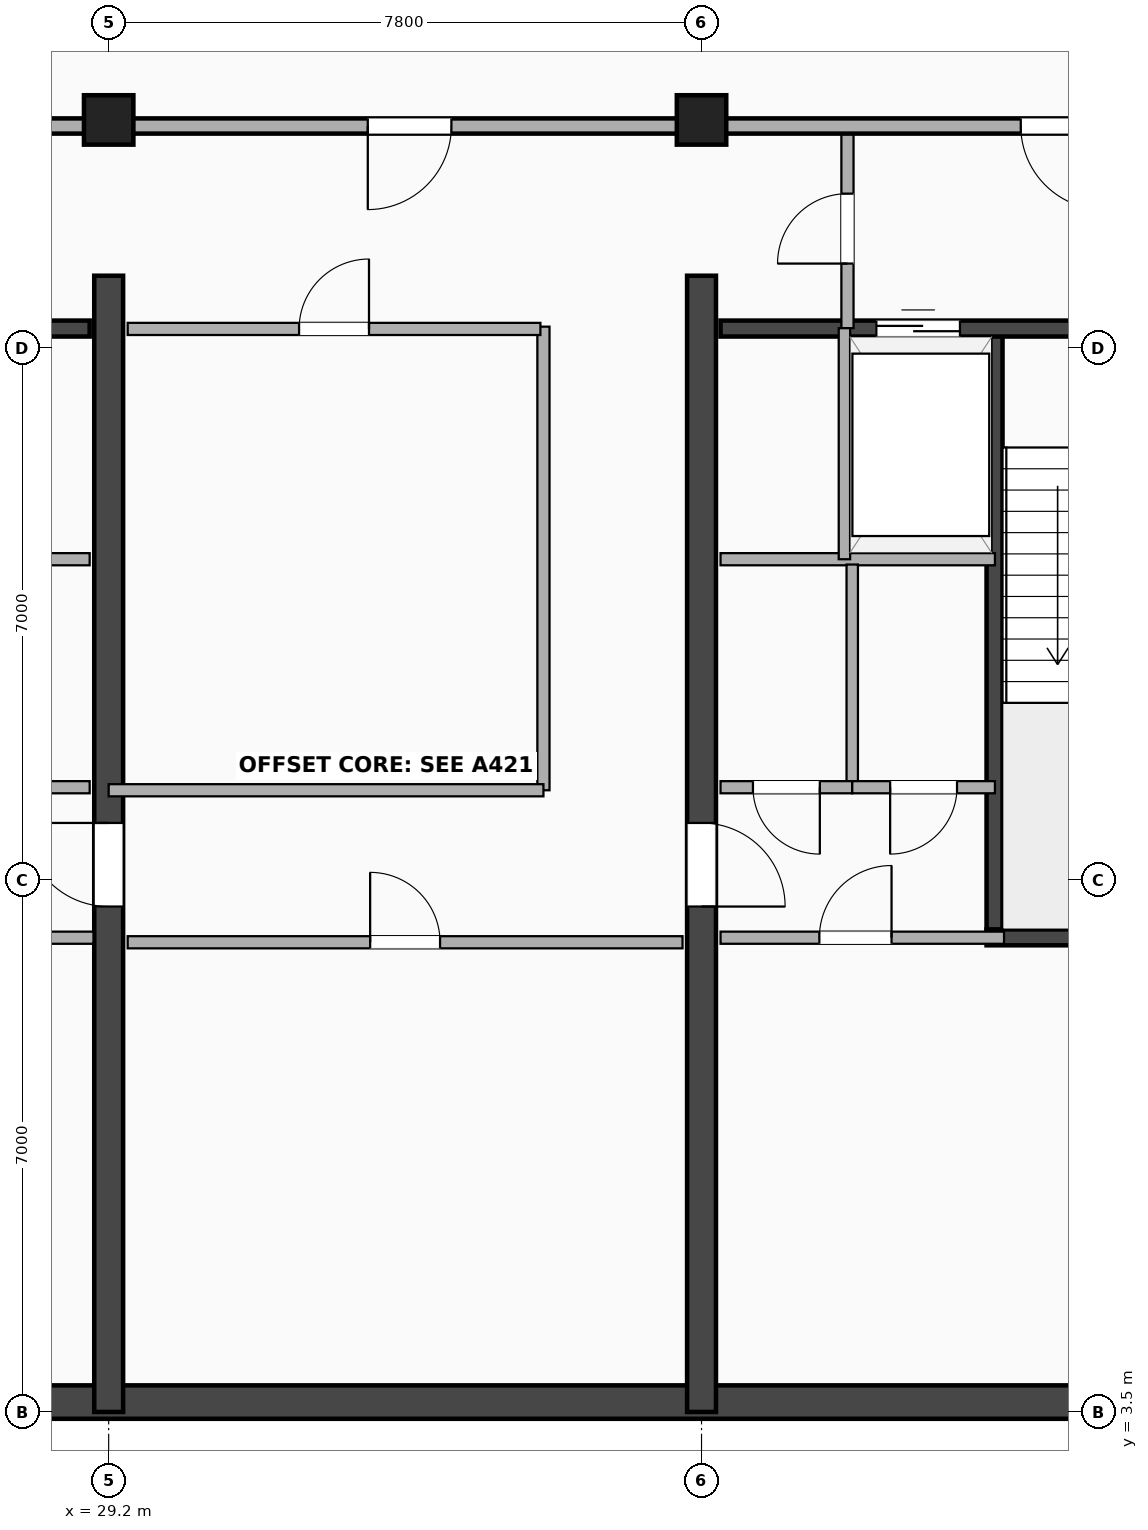
"""IFC4 building model, lengths in metres.
Left out: names, types, materials, properties, quantities, classifications, styles, units other than length and angle.
Written with IfcOpenShell. Run it as: python <this file> out.ifc"""

import sys

from ifc_helpers import new_model, si_unit, direction, frame, frame_2d, origin, origin_2d, place, context, subcontext, project, spatial, rectangle, extrude, element, fill, save


model = new_model("IFC4")
c1 = context("Model", 3, precision=1e-05, world=origin(), true_north=direction((0.0, 1.0)))
c2 = subcontext(c1, "Body", "Model", "MODEL_VIEW")
j1 = project(units=[si_unit("LENGTHUNIT", "METRE"), si_unit("PLANEANGLEUNIT", "RADIAN")], contexts=[c1])
p1 = place(None, origin())
s1 = spatial("IfcSite", under=j1, at=p1, CompositionType="ELEMENT")
p2 = place(p1, origin())
s2 = spatial("IfcBuilding", under=s1, at=p2, CompositionType="ELEMENT")
p3 = place(p2, frame((0.0, 0.0, 307.9)))
s3 = spatial("IfcBuildingStorey", under=s2, at=p3, CompositionType="ELEMENT", Elevation=307.9)
p4 = place(p3, frame((20.3, 3.63, 0.0), z_axis=(0.0, 0.0, 1.0), x_axis=(1.0, 0.0, 0.0)))
e1 = element("IfcWall", 1, at=p4, inside=s3, PredefinedType="SHEAR", context=c2, shape_type="SweptSolid", body=[
    extrude(rectangle(XDim=24.5, YDim=0.44, at=frame_2d((12.25, 0.0))), origin(), (0.0, 0.0, 1.0), 4.3),
])
p5 = place(p3, frame((29.2, 3.5, 0.0), z_axis=(0.0, 0.0, 1.0), x_axis=(0.0, 1.0, 0.0)))
e2 = element("IfcWall", 2, at=p5, inside=s3, PredefinedType="SHEAR", context=c2, shape_type="SweptSolid", body=[
    extrude(rectangle(XDim=14.95, YDim=0.38, at=frame_2d((7.475, 0.0))), origin(), (0.0, 0.0, 1.0), 4.3),
])
p6 = place(p5, frame((7.75, 0.0, 0.0), z_axis=(0.0, 0.0, 1.0), x_axis=(-1.0, 0.0, 0.0)))
e3 = element("IfcOpeningElement", 3, at=p6, cuts=e2, PredefinedType="OPENING", context=c2, shape_type="SweptSolid", body=[
    extrude(rectangle(XDim=1.1, YDim=2.15, at=frame_2d((0.55, 1.075))), frame((0.0, 0.2, 0.0), z_axis=(0.0, -1.0, 0.0), x_axis=(1.0, 0.0, 0.0)), (0.0, 0.0, 1.0), 0.4),
])
p7 = place(p3, frame((37.0, 3.5, 0.0), z_axis=(0.0, 0.0, 1.0), x_axis=(0.0, 1.0, 0.0)))
e4 = element("IfcWall", 4, at=p7, inside=s3, PredefinedType="SHEAR", context=c2, shape_type="SweptSolid", body=[
    extrude(rectangle(XDim=14.95, YDim=0.38, at=frame_2d((7.475, 0.0))), origin(), (0.0, 0.0, 1.0), 4.3),
])
p8 = place(p7, frame((6.65, 0.0, 0.0)))
e5 = element("IfcOpeningElement", 5, at=p8, cuts=e4, PredefinedType="OPENING", context=c2, shape_type="SweptSolid", body=[
    extrude(rectangle(XDim=1.1, YDim=2.15, at=frame_2d((0.55, 1.075))), frame((0.0, 0.2, 0.0), z_axis=(0.0, -1.0, 0.0), x_axis=(1.0, 0.0, 0.0)), (0.0, 0.0, 1.0), 0.4),
])
p9 = place(p3, frame((20.65, 17.755, 0.0), z_axis=(0.0, 0.0, 1.0), x_axis=(1.0, 0.0, 0.0)))
e6 = element("IfcWall", 6, at=p9, inside=s3, PredefinedType="SHEAR", context=c2, shape_type="SweptSolid", body=[
    extrude(rectangle(XDim=8.3, YDim=0.21, at=frame_2d((4.15, 0.0))), origin(), (0.0, 0.0, 1.0), 4.3),
])
p10 = place(p9, frame((2.2, 0.0, 0.0), z_axis=(0.0, 0.0, 1.0), x_axis=(-1.0, 0.0, 0.0)))
e7 = element("IfcOpeningElement", 7, at=p10, cuts=e6, PredefinedType="OPENING", context=c2, shape_type="SweptSolid", body=[
    extrude(rectangle(XDim=1.05, YDim=2.15, at=frame_2d((0.525, 1.075))), frame((0.0, 0.115, 0.0), z_axis=(0.0, -1.0, 0.0), x_axis=(1.0, 0.0, 0.0)), (0.0, 0.0, 1.0), 0.23),
])
p11 = place(p9, frame((4.15, 0.0, 0.0)))
e8 = element("IfcOpeningElement", 8, at=p11, cuts=e6, PredefinedType="OPENING", context=c2, shape_type="SweptSolid", body=[
    extrude(rectangle(XDim=1.1, YDim=2.18, at=frame_2d((0.55, 1.09))), frame((0.0, 0.115, 0.0), z_axis=(0.0, -1.0, 0.0), x_axis=(1.0, 0.0, 0.0)), (0.0, 0.0, 1.0), 0.23),
])
p12 = place(p3, frame((40.855, 9.745, 0.0), z_axis=(0.0, 0.0, 1.0), x_axis=(0.0, 1.0, 0.0)))
e9 = element("IfcWall", 9, at=p12, inside=s3, PredefinedType="SHEAR", context=c2, shape_type="SweptSolid", body=[
    extrude(rectangle(XDim=8.01, YDim=0.21, at=frame_2d((4.005, 0.0))), origin(), (0.0, 0.0, 1.0), 4.3),
])
p13 = place(p3, frame((40.75, 9.745, 0.0), z_axis=(0.0, 0.0, 1.0), x_axis=(1.0, 0.0, 0.0)))
e10 = element("IfcWall", 10, at=p13, inside=s3, PredefinedType="SHEAR", context=c2, shape_type="SweptSolid", body=[
    extrude(rectangle(XDim=3.66, YDim=0.21, at=frame_2d((1.83, 0.0))), origin(), (0.0, 0.0, 1.0), 4.3),
])
p14 = place(p3, frame((37.25, 17.755, 0.0), z_axis=(0.0, 0.0, 1.0), x_axis=(1.0, 0.0, 0.0)))
e11 = element("IfcWall", 11, at=p14, inside=s3, PredefinedType="SHEAR", context=c2, shape_type="SweptSolid", body=[
    extrude(rectangle(XDim=7.2, YDim=0.21, at=frame_2d((3.6, 0.0))), origin(), (0.0, 0.0, 1.0), 4.3),
])
p15 = place(p14, frame((2.05, 0.0, 0.0)))
e12 = element("IfcOpeningElement", 12, at=p15, cuts=e11, PredefinedType="OPENING", context=c2, shape_type="SweptSolid", body=[
    extrude(rectangle(XDim=1.1, YDim=2.18, at=frame_2d((0.55, 1.09))), frame((0.0, 0.115, 0.0), z_axis=(0.0, -1.0, 0.0), x_axis=(1.0, 0.0, 0.0)), (0.0, 0.0, 1.0), 0.23),
])
p16 = place(p14, frame((5.78, 0.0, 0.0), z_axis=(0.0, 0.0, 1.0), x_axis=(-1.0, 0.0, 0.0)))
e13 = element("IfcOpeningElement", 13, at=p16, cuts=e11, PredefinedType="OPENING", context=c2, shape_type="SweptSolid", body=[
    extrude(rectangle(XDim=1.05, YDim=2.15, at=frame_2d((0.525, 1.075))), frame((0.0, 0.115, 0.0), z_axis=(0.0, -1.0, 0.0), x_axis=(1.0, 0.0, 0.0)), (0.0, 0.0, 1.0), 0.23),
])
for number, where, z_axis, x_axis in (
    (14, (29.2, 20.5, -0.3), (0.0, 0.0, 1.0), (1.0, 0.0, 0.0)),
    (15, (37.0, 20.5, -0.3), (0.0, 0.0, 1.0), (1.0, 0.0, 0.0)),
):
    element("IfcColumn", number, at=place(p3, frame(where, z_axis=z_axis, x_axis=x_axis)), inside=s3, PredefinedType="COLUMN", context=c2, shape_type="SweptSolid", body=[
        extrude(rectangle(XDim=0.65, YDim=0.65, at=origin_2d()), origin(), (0.0, 0.0, 1.0), 4.6),
    ])
p17 = place(p3, frame((38.92, 17.76, 0.0), z_axis=(0.0, 0.0, 1.0), x_axis=(0.0, 1.0, 0.0)))
e16 = element("IfcWall", 16, at=p17, inside=s3, PredefinedType="PARTITIONING", context=c2, shape_type="SweptSolid", body=[
    extrude(rectangle(XDim=2.66, YDim=0.16, at=frame_2d((1.33, 0.0))), origin(), (0.0, 0.0, 1.0), 4.3),
])
p18 = place(p17, frame((1.77, 0.0, 0.0), z_axis=(0.0, 0.0, 1.0), x_axis=(-1.0, 0.0, 0.0)))
e17 = element("IfcOpeningElement", 17, at=p18, cuts=e16, PredefinedType="OPENING", context=c2, shape_type="SweptSolid", body=[
    extrude(rectangle(XDim=0.92, YDim=2.08, at=frame_2d((0.46, 1.04))), frame((0.0, 0.09, 0.0), z_axis=(0.0, -1.0, 0.0), x_axis=(1.0, 0.0, 0.0)), (0.0, 0.0, 1.0), 0.18),
])
p19 = place(p3, frame((24.22, 14.72, 0.0), z_axis=(0.0, 0.0, 1.0), x_axis=(1.0, 0.0, 0.0)))
e18 = element("IfcWall", 18, at=p19, inside=s3, PredefinedType="PARTITIONING", context=c2, shape_type="SweptSolid", body=[
    extrude(rectangle(XDim=4.73, YDim=0.16, at=frame_2d((2.365, 0.0))), origin(), (0.0, 0.0, 1.0), 4.3),
])
p20 = place(p3, frame((37.25, 14.72, 0.0), z_axis=(0.0, 0.0, 1.0), x_axis=(1.0, 0.0, 0.0)))
e19 = element("IfcWall", 19, at=p20, inside=s3, PredefinedType="PARTITIONING", context=c2, shape_type="SweptSolid", body=[
    extrude(rectangle(XDim=3.61, YDim=0.16, at=frame_2d((1.805, 0.0))), origin(), (0.0, 0.0, 1.0), 4.3),
])
p21 = place(p3, frame((38.88, 14.72, 0.0), z_axis=(0.0, 0.0, 1.0), x_axis=(0.0, 1.0, 0.0)))
e20 = element("IfcWall", 20, at=p21, inside=s3, PredefinedType="PARTITIONING", context=c2, shape_type="SweptSolid", body=[
    extrude(rectangle(XDim=3.04, YDim=0.15, at=frame_2d((1.52, 0.0))), origin(), (0.0, 0.0, 1.0), 4.3),
])
p22 = place(p3, frame((26.38, 20.42, 0.0), z_axis=(0.0, 0.0, 1.0), x_axis=(1.0, 0.0, 0.0)))
e21 = element("IfcWall", 21, at=p22, inside=s3, PredefinedType="PARTITIONING", context=c2, shape_type="SweptSolid", body=[
    extrude(rectangle(XDim=2.82, YDim=0.2, at=frame_2d((1.41, 0.0))), origin(), (0.0, 0.0, 1.0), 2.605),
])
p23 = place(p3, frame((29.2, 20.42, 0.0), z_axis=(0.0, 0.0, 1.0), x_axis=(1.0, 0.0, 0.0)))
e22 = element("IfcWall", 22, at=p23, inside=s3, PredefinedType="PARTITIONING", context=c2, shape_type="SweptSolid", body=[
    extrude(rectangle(XDim=7.8, YDim=0.2, at=frame_2d((3.9, 0.0))), origin(), (0.0, 0.0, 1.0), 2.605),
])
p24 = place(p23, frame((3.409, 0.0, 0.0)))
e23 = element("IfcOpeningElement", 23, at=p24, cuts=e22, PredefinedType="OPENING", context=c2, shape_type="SweptSolid", body=[
    extrude(rectangle(XDim=1.1, YDim=2.15, at=frame_2d((0.55, 1.075))), frame((0.0, 0.11, 0.0), z_axis=(0.0, -1.0, 0.0), x_axis=(1.0, 0.0, 0.0)), (0.0, 0.0, 1.0), 0.22),
])
p25 = place(p3, frame((37.0, 20.42, 0.0), z_axis=(0.0, 0.0, 1.0), x_axis=(1.0, 0.0, 0.0)))
e24 = element("IfcWall", 24, at=p25, inside=s3, PredefinedType="PARTITIONING", context=c2, shape_type="SweptSolid", body=[
    extrude(rectangle(XDim=7.45, YDim=0.2, at=frame_2d((3.725, 0.0))), origin(), (0.0, 0.0, 1.0), 2.605),
])
p26 = place(p25, frame((4.2, 0.0, 0.0)))
e25 = element("IfcOpeningElement", 25, at=p26, cuts=e24, PredefinedType="OPENING", context=c2, shape_type="SweptSolid", body=[
    extrude(rectangle(XDim=1.1, YDim=2.15, at=frame_2d((0.55, 1.075))), frame((0.0, 0.11, 0.0), z_axis=(0.0, -1.0, 0.0), x_axis=(1.0, 0.0, 0.0)), (0.0, 0.0, 1.0), 0.22),
])
p27 = place(p3, frame((24.22, 11.72, 0.0), z_axis=(0.0, 0.0, 1.0), x_axis=(1.0, 0.0, 0.0)))
e26 = element("IfcWall", 26, at=p27, inside=s3, PredefinedType="PARTITIONING", context=c2, shape_type="SweptSolid", body=[
    extrude(rectangle(XDim=4.73, YDim=0.16, at=frame_2d((2.365, 0.0))), origin(), (0.0, 0.0, 1.0), 4.3),
])
p28 = place(p27, frame((1.905, 0.0, 0.0)))
e27 = element("IfcOpeningElement", 27, at=p28, cuts=e26, PredefinedType="OPENING", context=c2, shape_type="SweptSolid", body=[
    extrude(rectangle(XDim=0.92, YDim=2.08, at=frame_2d((0.46, 1.04))), frame((0.0, 0.09, 0.0), z_axis=(0.0, -1.0, 0.0), x_axis=(1.0, 0.0, 0.0)), (0.0, 0.0, 1.0), 0.18),
])
p29 = place(p3, frame((38.983, 11.72, 0.0), z_axis=(0.0, 0.0, 1.0), x_axis=(0.0, 1.0, 0.0)))
e28 = element("IfcWall", 28, at=p29, inside=s3, PredefinedType="PARTITIONING", context=c2, shape_type="SweptSolid", body=[
    extrude(rectangle(XDim=2.93, YDim=0.15, at=frame_2d((1.465, 0.0))), origin(), (0.0, 0.0, 1.0), 4.3),
])
p30 = place(p3, frame((37.25, 11.72, 0.0), z_axis=(0.0, 0.0, 1.0), x_axis=(1.0, 0.0, 0.0)))
e29 = element("IfcWall", 29, at=p30, inside=s3, PredefinedType="PARTITIONING", context=c2, shape_type="SweptSolid", body=[
    extrude(rectangle(XDim=1.733, YDim=0.16, at=frame_2d((0.866, 0.0))), origin(), (0.0, 0.0, 1.0), 4.3),
])
p31 = place(p30, frame((0.427, 0.0, 0.0)))
e30 = element("IfcOpeningElement", 30, at=p31, cuts=e29, PredefinedType="OPENING", context=c2, shape_type="SweptSolid", body=[
    extrude(rectangle(XDim=0.88, YDim=2.08, at=frame_2d((0.44, 1.04))), frame((0.0, 0.09, 0.0), z_axis=(0.0, -1.0, 0.0), x_axis=(1.0, 0.0, 0.0)), (0.0, 0.0, 1.0), 0.18),
])
p32 = place(p3, frame((38.983, 11.72, 0.0), z_axis=(0.0, 0.0, 1.0), x_axis=(1.0, 0.0, 0.0)))
e31 = element("IfcWall", 31, at=p32, inside=s3, PredefinedType="PARTITIONING", context=c2, shape_type="SweptSolid", body=[
    extrude(rectangle(XDim=1.877, YDim=0.16, at=frame_2d((0.938, 0.0))), origin(), (0.0, 0.0, 1.0), 4.3),
])
p33 = place(p32, frame((0.499, 0.0, 0.0)))
e32 = element("IfcOpeningElement", 32, at=p33, cuts=e31, PredefinedType="OPENING", context=c2, shape_type="SweptSolid", body=[
    extrude(rectangle(XDim=0.88, YDim=2.08, at=frame_2d((0.44, 1.04))), frame((0.0, 0.09, 0.0), z_axis=(0.0, -1.0, 0.0), x_axis=(1.0, 0.0, 0.0)), (0.0, 0.0, 1.0), 0.18),
])
p34 = place(p3, frame((24.2, 9.74, 0.0), z_axis=(0.0, 0.0, 1.0), x_axis=(1.0, 0.0, 0.0)))
e33 = element("IfcWall", 33, at=p34, inside=s3, PredefinedType="PARTITIONING", context=c2, shape_type="SweptSolid", body=[
    extrude(rectangle(XDim=4.8, YDim=0.16, at=frame_2d((2.4, 0.0))), origin(), (0.0, 0.0, 1.0), 4.3),
])
p35 = place(p34, frame((2.75, 0.0, 0.0), z_axis=(0.0, 0.0, 1.0), x_axis=(-1.0, 0.0, 0.0)))
e34 = element("IfcOpeningElement", 34, at=p35, cuts=e33, PredefinedType="OPENING", context=c2, shape_type="SweptSolid", body=[
    extrude(rectangle(XDim=0.95, YDim=2.15, at=frame_2d((0.475, 1.075))), frame((0.0, 0.09, 0.0), z_axis=(0.0, -1.0, 0.0), x_axis=(1.0, 0.0, 0.0)), (0.0, 0.0, 1.0), 0.18),
])
p36 = place(p3, frame((37.25, 9.74, 0.0), z_axis=(0.0, 0.0, 1.0), x_axis=(1.0, 0.0, 0.0)))
e35 = element("IfcWall", 35, at=p36, inside=s3, PredefinedType="PARTITIONING", context=c2, shape_type="SweptSolid", body=[
    extrude(rectangle(XDim=3.73, YDim=0.16, at=frame_2d((1.865, 0.0))), origin(), (0.0, 0.0, 1.0), 4.3),
])
p37 = place(p36, frame((2.25, 0.0, 0.0), z_axis=(0.0, 0.0, 1.0), x_axis=(-1.0, 0.0, 0.0)))
e36 = element("IfcOpeningElement", 36, at=p37, cuts=e35, PredefinedType="OPENING", context=c2, shape_type="SweptSolid", body=[
    extrude(rectangle(XDim=0.95, YDim=2.15, at=frame_2d((0.475, 1.075))), frame((0.0, 0.09, 0.0), z_axis=(0.0, -1.0, 0.0), x_axis=(1.0, 0.0, 0.0)), (0.0, 0.0, 1.0), 0.18),
])
p38 = place(p3, frame((34.92, 11.68, 0.0), z_axis=(0.0, 0.0, 1.0), x_axis=(0.0, 1.0, 0.0)))
e37 = element("IfcWall", 37, at=p38, inside=s3, PredefinedType="PARTITIONING", context=c2, shape_type="SweptSolid", body=[
    extrude(rectangle(XDim=6.1, YDim=0.16, at=frame_2d((3.05, 0.0))), origin(), (0.0, 0.0, 1.0), 4.3),
])
p39 = place(p3, frame((29.45, 9.68, 0.0), z_axis=(0.0, 0.0, 1.0), x_axis=(1.0, 0.0, 0.0)))
e38 = element("IfcWall", 38, at=p39, inside=s3, PredefinedType="PARTITIONING", context=c2, shape_type="SweptSolid", body=[
    extrude(rectangle(XDim=7.3, YDim=0.16, at=frame_2d((3.65, 0.0))), origin(), (0.0, 0.0, 1.0), 4.3),
])
p40 = place(p39, frame((4.11, 0.0, 0.0), z_axis=(0.0, 0.0, 1.0), x_axis=(-1.0, 0.0, 0.0)))
e39 = element("IfcOpeningElement", 39, at=p40, cuts=e38, PredefinedType="OPENING", context=c2, shape_type="SweptSolid", body=[
    extrude(rectangle(XDim=0.92, YDim=2.08, at=frame_2d((0.46, 1.04))), frame((0.0, 0.09, 0.0), z_axis=(0.0, -1.0, 0.0), x_axis=(1.0, 0.0, 0.0)), (0.0, 0.0, 1.0), 0.18),
])
p41 = place(p3, frame((29.2, 11.68, 0.0), z_axis=(0.0, 0.0, 1.0), x_axis=(1.0, 0.0, 0.0)))
e40 = element("IfcWall", 40, at=p41, inside=s3, PredefinedType="PARTITIONING", context=c2, shape_type="SweptSolid", body=[
    extrude(rectangle(XDim=5.72, YDim=0.16, at=frame_2d((2.86, 0.0))), origin(), (0.0, 0.0, 1.0), 4.3),
])
p42 = place(p3, frame((29.45, 17.75, 0.0), z_axis=(0.0, 0.0, 1.0), x_axis=(1.0, 0.0, 0.0)))
e41 = element("IfcWall", 41, at=p42, inside=s3, PredefinedType="PARTITIONING", context=c2, shape_type="SweptSolid", body=[
    extrude(rectangle(XDim=5.43, YDim=0.16, at=frame_2d((2.715, 0.0))), origin(), (0.0, 0.0, 1.0), 4.3),
])
p43 = place(p42, frame((3.175, 0.0, 0.0), z_axis=(0.0, 0.0, 1.0), x_axis=(-1.0, 0.0, 0.0)))
e42 = element("IfcOpeningElement", 42, at=p43, cuts=e41, PredefinedType="OPENING", context=c2, shape_type="SweptSolid", body=[
    extrude(rectangle(XDim=0.92, YDim=2.08, at=frame_2d((0.46, 1.04))), frame((0.0, 0.09, 0.0), z_axis=(0.0, -1.0, 0.0), x_axis=(1.0, 0.0, 0.0)), (0.0, 0.0, 1.0), 0.18),
])
p44 = place(p15, origin())
e43 = element("IfcDoor", 43, at=p44, inside=s3, OperationType="DOUBLE_DOOR_SLIDING", PredefinedType="DOOR", context=c2, shape_type="SweptSolid", body=[
    extrude(rectangle(XDim=1.1, YDim=2.18, at=frame_2d((0.55, 1.09))), frame((0.0, 0.025, 0.0), z_axis=(0.0, -1.0, 0.0), x_axis=(1.0, 0.0, 0.0)), (0.0, 0.0, 1.0), 0.05),
])
fill(e12, e43)
p45 = place(p6, origin())
e44 = element("IfcDoor", 44, at=p45, inside=s3, OperationType="SINGLE_SWING_RIGHT", PredefinedType="DOOR", context=c2, shape_type="SweptSolid", body=[
    extrude(rectangle(XDim=1.1, YDim=2.15, at=frame_2d((0.55, 1.075))), frame((0.0, 0.025, 0.0), z_axis=(0.0, -1.0, 0.0), x_axis=(1.0, 0.0, 0.0)), (0.0, 0.0, 1.0), 0.05),
])
fill(e3, e44)
p46 = place(p8, origin())
e45 = element("IfcDoor", 45, at=p46, inside=s3, OperationType="SINGLE_SWING_LEFT", PredefinedType="DOOR", context=c2, shape_type="SweptSolid", body=[
    extrude(rectangle(XDim=1.1, YDim=2.15, at=frame_2d((0.55, 1.075))), frame((0.0, 0.025, 0.0), z_axis=(0.0, -1.0, 0.0), x_axis=(1.0, 0.0, 0.0)), (0.0, 0.0, 1.0), 0.05),
])
fill(e5, e45)
p47 = place(p18, origin())
e46 = element("IfcDoor", 46, at=p47, inside=s3, OperationType="SINGLE_SWING_LEFT", PredefinedType="DOOR", context=c2, shape_type="SweptSolid", body=[
    extrude(rectangle(XDim=0.92, YDim=2.08, at=frame_2d((0.46, 1.04))), frame((0.0, 0.025, 0.0), z_axis=(0.0, -1.0, 0.0), x_axis=(1.0, 0.0, 0.0)), (0.0, 0.0, 1.0), 0.05),
])
fill(e17, e46)
p48 = place(p24, origin())
e47 = element("IfcDoor", 47, at=p48, inside=s3, OperationType="SINGLE_SWING_LEFT", PredefinedType="DOOR", context=c2, shape_type="SweptSolid", body=[
    extrude(rectangle(XDim=1.1, YDim=2.15, at=frame_2d((0.55, 1.075))), frame((0.0, 0.025, 0.0), z_axis=(0.0, -1.0, 0.0), x_axis=(1.0, 0.0, 0.0)), (0.0, 0.0, 1.0), 0.05),
])
fill(e23, e47)
p49 = place(p26, origin())
e48 = element("IfcDoor", 48, at=p49, inside=s3, OperationType="SINGLE_SWING_RIGHT", PredefinedType="DOOR", context=c2, shape_type="SweptSolid", body=[
    extrude(rectangle(XDim=1.1, YDim=2.15, at=frame_2d((0.55, 1.075))), frame((0.0, 0.025, 0.0), z_axis=(0.0, -1.0, 0.0), x_axis=(1.0, 0.0, 0.0)), (0.0, 0.0, 1.0), 0.05),
])
fill(e25, e48)
p50 = place(p31, origin())
e49 = element("IfcDoor", 49, at=p50, inside=s3, OperationType="SINGLE_SWING_RIGHT", PredefinedType="DOOR", context=c2, shape_type="SweptSolid", body=[
    extrude(rectangle(XDim=0.88, YDim=2.08, at=frame_2d((0.44, 1.04))), frame((0.0, 0.025, 0.0), z_axis=(0.0, -1.0, 0.0), x_axis=(1.0, 0.0, 0.0)), (0.0, 0.0, 1.0), 0.05),
])
fill(e30, e49)
p51 = place(p33, origin())
e50 = element("IfcDoor", 50, at=p51, inside=s3, OperationType="SINGLE_SWING_LEFT", PredefinedType="DOOR", context=c2, shape_type="SweptSolid", body=[
    extrude(rectangle(XDim=0.88, YDim=2.08, at=frame_2d((0.44, 1.04))), frame((0.0, 0.025, 0.0), z_axis=(0.0, -1.0, 0.0), x_axis=(1.0, 0.0, 0.0)), (0.0, 0.0, 1.0), 0.05),
])
fill(e32, e50)
p52 = place(p37, origin())
e51 = element("IfcDoor", 51, at=p52, inside=s3, OperationType="SINGLE_SWING_RIGHT", PredefinedType="DOOR", context=c2, shape_type="SweptSolid", body=[
    extrude(rectangle(XDim=0.95, YDim=2.15, at=frame_2d((0.475, 1.075))), frame((0.0, 0.025, 0.0), z_axis=(0.0, -1.0, 0.0), x_axis=(1.0, 0.0, 0.0)), (0.0, 0.0, 1.0), 0.05),
])
fill(e36, e51)
p53 = place(p40, origin())
e52 = element("IfcDoor", 52, at=p53, inside=s3, OperationType="SINGLE_SWING_LEFT", PredefinedType="DOOR", context=c2, shape_type="SweptSolid", body=[
    extrude(rectangle(XDim=0.92, YDim=2.08, at=frame_2d((0.46, 1.04))), frame((0.0, 0.025, 0.0), z_axis=(0.0, -1.0, 0.0), x_axis=(1.0, 0.0, 0.0)), (0.0, 0.0, 1.0), 0.05),
])
fill(e39, e52)
p54 = place(p43, origin())
e53 = element("IfcDoor", 53, at=p54, inside=s3, OperationType="SINGLE_SWING_RIGHT", PredefinedType="DOOR", context=c2, shape_type="SweptSolid", body=[
    extrude(rectangle(XDim=0.92, YDim=2.08, at=frame_2d((0.46, 1.04))), frame((0.0, 0.025, 0.0), z_axis=(0.0, -1.0, 0.0), x_axis=(1.0, 0.0, 0.0)), (0.0, 0.0, 1.0), 0.05),
])
fill(e42, e53)
save(model, sys.argv[1])
